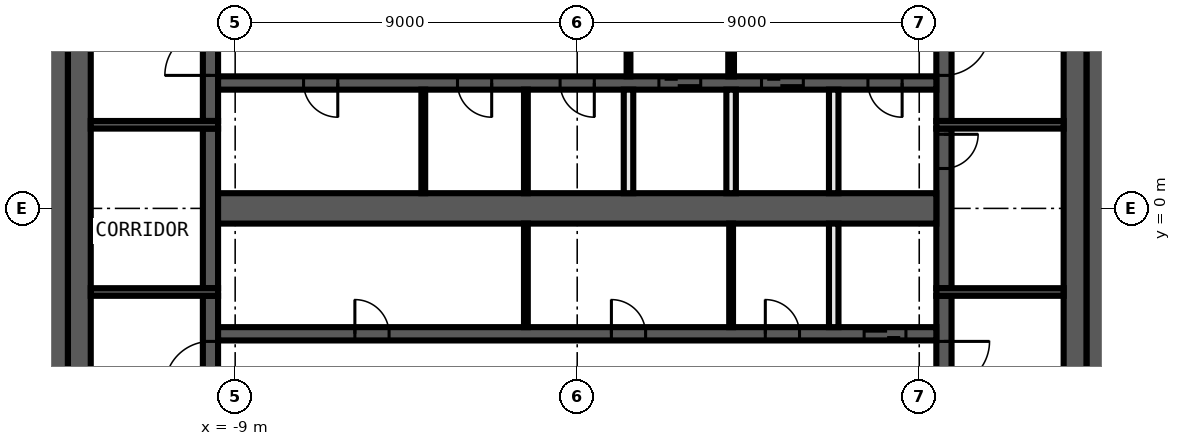
"""IFC4 building model, lengths in metres.
Left out: names, types, materials, properties, quantities, classifications, styles, units other than length and angle.
Written with IfcOpenShell. Run it as: python <this file> out.ifc"""

import sys

from ifc_helpers import new_model, si_unit, direction, frame, frame_2d, origin, place, context, subcontext, project, spatial, rectangle, extrude, element, fill, save


model = new_model("IFC4")
c1 = context("Model", 3, precision=1e-05, world=origin(), true_north=direction((0.0, 1.0)))
c2 = subcontext(c1, "Body", "Model", "MODEL_VIEW")
j1 = project(units=[si_unit("LENGTHUNIT", "METRE"), si_unit("PLANEANGLEUNIT", "RADIAN")], contexts=[c1])
p1 = place(None, origin())
s1 = spatial("IfcSite", under=j1, at=p1, CompositionType="ELEMENT")
p2 = place(p1, origin())
s2 = spatial("IfcBuilding", under=s1, at=p2, CompositionType="ELEMENT")
p3 = place(p2, frame((0.0, 0.0, 315.2)))
s3 = spatial("IfcBuildingStorey", under=s2, at=p3, CompositionType="ELEMENT", Elevation=315.2)
for number, where, z_axis, x_axis in (
    (1, (13.7, 10.4, 0.0), (0.0, 0.0, 1.0), (0.0, -1.0, 0.0)),
    (2, (-13.7, -10.4, 0.0), (0.0, 0.0, 1.0), (0.0, 1.0, 0.0)),
):
    element("IfcWall", number, at=place(p3, frame(where, z_axis=z_axis, x_axis=x_axis)), inside=s3, PredefinedType="SHEAR", context=c2, shape_type="SweptSolid", body=[
        extrude(rectangle(XDim=20.8, YDim=0.6, at=frame_2d((10.4, 0.0))), origin(), (0.0, 0.0, 1.0), 3.82),
    ])
for number, where, z_axis, x_axis in (
    (3, (13.1, 9.8, 0.0), (0.0, 0.0, 1.0), (0.0, -1.0, 0.0)),
    (4, (-13.1, -9.8, 0.0), (0.0, 0.0, 1.0), (0.0, 1.0, 0.0)),
):
    element("IfcWall", number, at=place(p3, frame(where, z_axis=z_axis, x_axis=x_axis)), inside=s3, PredefinedType="SHEAR", context=c2, shape_type="SweptSolid", body=[
        extrude(rectangle(XDim=19.6, YDim=0.6, at=frame_2d((9.8, 0.0))), origin(), (0.0, 0.0, 1.0), 3.82),
    ])
p4 = place(p3, frame((9.65, -2.3, 0.0), z_axis=(0.0, 0.0, 1.0), x_axis=(0.0, -1.0, 0.0)))
e5 = element("IfcWall", 5, at=p4, inside=s3, PredefinedType="SHEAR", context=c2, shape_type="SweptSolid", body=[
    extrude(rectangle(XDim=7.5, YDim=0.4, at=frame_2d((3.75, 0.0))), origin(), (0.0, 0.0, 1.0), 3.82),
])
p5 = place(p4, frame((1.2, 0.0, 0.0)))
e6 = element("IfcOpeningElement", 6, at=p5, cuts=e5, PredefinedType="OPENING", context=c2, shape_type="SweptSolid", body=[
    extrude(rectangle(XDim=1.2, YDim=2.1, at=frame_2d((0.6, 1.05))), frame((0.0, 0.21, 0.0), z_axis=(0.0, -1.0, 0.0), x_axis=(1.0, 0.0, 0.0)), (0.0, 0.0, 1.0), 0.42),
])
p6 = place(p3, frame((9.65, 2.1, 0.0), z_axis=(0.0, 0.0, 1.0), x_axis=(0.0, -1.0, 0.0)))
e7 = element("IfcWall", 7, at=p6, inside=s3, PredefinedType="SHEAR", context=c2, shape_type="SweptSolid", body=[
    extrude(rectangle(XDim=4.2, YDim=0.4, at=frame_2d((2.1, 0.0))), origin(), (0.0, 0.0, 1.0), 3.82),
])
p7 = place(p6, frame((0.15, 0.0, 0.0)))
e8 = element("IfcOpeningElement", 8, at=p7, cuts=e7, PredefinedType="OPENING", context=c2, shape_type="SweptSolid", body=[
    extrude(rectangle(XDim=0.9, YDim=2.1, at=frame_2d((0.45, 1.05))), frame((0.0, 0.21, 0.0), z_axis=(0.0, -1.0, 0.0), x_axis=(1.0, 0.0, 0.0)), (0.0, 0.0, 1.0), 0.42),
])
p8 = place(p3, frame((9.65, 9.8, 0.0), z_axis=(0.0, 0.0, 1.0), x_axis=(0.0, -1.0, 0.0)))
e9 = element("IfcWall", 9, at=p8, inside=s3, PredefinedType="SHEAR", context=c2, shape_type="SweptSolid", body=[
    extrude(rectangle(XDim=7.5, YDim=0.4, at=frame_2d((3.75, 0.0))), origin(), (0.0, 0.0, 1.0), 3.82),
])
p9 = place(p8, frame((5.1, 0.0, 0.0)))
e10 = element("IfcOpeningElement", 10, at=p9, cuts=e9, PredefinedType="OPENING", context=c2, shape_type="SweptSolid", body=[
    extrude(rectangle(XDim=1.2, YDim=2.1, at=frame_2d((0.6, 1.05))), frame((0.0, 0.21, 0.0), z_axis=(0.0, -1.0, 0.0), x_axis=(1.0, 0.0, 0.0)), (0.0, 0.0, 1.0), 0.42),
])
p10 = place(p3, frame((-9.65, -9.8, 0.0), z_axis=(0.0, 0.0, 1.0), x_axis=(0.0, 1.0, 0.0)))
e11 = element("IfcWall", 11, at=p10, inside=s3, PredefinedType="SHEAR", context=c2, shape_type="SweptSolid", body=[
    extrude(rectangle(XDim=7.5, YDim=0.4, at=frame_2d((3.75, 0.0))), origin(), (0.0, 0.0, 1.0), 3.82),
])
p11 = place(p10, frame((5.1, 0.0, 0.0)))
e12 = element("IfcOpeningElement", 12, at=p11, cuts=e11, PredefinedType="OPENING", context=c2, shape_type="SweptSolid", body=[
    extrude(rectangle(XDim=1.2, YDim=2.1, at=frame_2d((0.6, 1.05))), frame((0.0, 0.21, 0.0), z_axis=(0.0, -1.0, 0.0), x_axis=(1.0, 0.0, 0.0)), (0.0, 0.0, 1.0), 0.42),
])
p12 = place(p3, frame((-9.65, -2.1, 0.0), z_axis=(0.0, 0.0, 1.0), x_axis=(0.0, 1.0, 0.0)))
e13 = element("IfcWall", 13, at=p12, inside=s3, PredefinedType="SHEAR", context=c2, shape_type="SweptSolid", body=[
    extrude(rectangle(XDim=4.2, YDim=0.4, at=frame_2d((2.1, 0.0))), origin(), (0.0, 0.0, 1.0), 3.82),
])
p13 = place(p3, frame((-9.65, 2.3, 0.0), z_axis=(0.0, 0.0, 1.0), x_axis=(0.0, 1.0, 0.0)))
e14 = element("IfcWall", 14, at=p13, inside=s3, PredefinedType="SHEAR", context=c2, shape_type="SweptSolid", body=[
    extrude(rectangle(XDim=7.5, YDim=0.4, at=frame_2d((3.75, 0.0))), origin(), (0.0, 0.0, 1.0), 3.82),
])
p14 = place(p13, frame((1.2, 0.0, 0.0)))
e15 = element("IfcOpeningElement", 15, at=p14, cuts=e14, PredefinedType="OPENING", context=c2, shape_type="SweptSolid", body=[
    extrude(rectangle(XDim=1.2, YDim=2.1, at=frame_2d((0.6, 1.05))), frame((0.0, 0.21, 0.0), z_axis=(0.0, -1.0, 0.0), x_axis=(1.0, 0.0, 0.0)), (0.0, 0.0, 1.0), 0.42),
])
for number, where, z_axis, x_axis in (
    (16, (9.45, 2.2, 0.0), (0.0, 0.0, 1.0), (1.0, 0.0, 0.0)),
    (17, (-9.45, 2.2, 0.0), (0.0, 0.0, 1.0), (-1.0, 0.0, 0.0)),
    (18, (9.45, -2.2, 0.0), (0.0, 0.0, 1.0), (1.0, 0.0, 0.0)),
    (19, (-9.45, -2.2, 0.0), (0.0, 0.0, 1.0), (-1.0, 0.0, 0.0)),
):
    element("IfcWall", number, at=place(p3, frame(where, z_axis=z_axis, x_axis=x_axis)), inside=s3, PredefinedType="SHEAR", context=c2, shape_type="SweptSolid", body=[
        extrude(rectangle(XDim=3.35, YDim=0.2, at=frame_2d((1.675, 0.0))), origin(), (0.0, 0.0, 1.0), 3.82),
    ])
p15 = place(p3, frame((9.45, 3.3, 0.0), z_axis=(0.0, 0.0, 1.0), x_axis=(-1.0, 0.0, 0.0)))
e20 = element("IfcWall", 20, at=p15, inside=s3, PredefinedType="SHEAR", context=c2, shape_type="SweptSolid", body=[
    extrude(rectangle(XDim=18.9, YDim=0.35, at=frame_2d((9.45, 0.0))), origin(), (0.0, 0.0, 1.0), 3.82),
])
p16 = place(p15, frame((6.2, 0.0, 0.0)))
e21 = element("IfcOpeningElement", 21, at=p16, cuts=e20, PredefinedType="OPENING", context=c2, shape_type="SweptSolid", body=[
    extrude(rectangle(XDim=1.1, YDim=2.1, at=frame_2d((0.55, 1.05))), frame((0.0, 0.185, 0.0), z_axis=(0.0, -1.0, 0.0), x_axis=(1.0, 0.0, 0.0)), (0.0, 0.0, 1.0), 0.37),
])
p17 = place(p15, frame((3.5, 0.0, 0.0)))
e22 = element("IfcOpeningElement", 22, at=p17, cuts=e20, PredefinedType="OPENING", context=c2, shape_type="SweptSolid", body=[
    extrude(rectangle(XDim=1.1, YDim=2.1, at=frame_2d((0.55, 1.05))), frame((0.0, 0.185, 0.0), z_axis=(0.0, -1.0, 0.0), x_axis=(1.0, 0.0, 0.0)), (0.0, 0.0, 1.0), 0.37),
])
p18 = place(p15, frame((0.9, 0.0, 0.0)))
e23 = element("IfcOpeningElement", 23, at=p18, cuts=e20, PredefinedType="OPENING", context=c2, shape_type="SweptSolid", body=[
    extrude(rectangle(XDim=0.9, YDim=2.1, at=frame_2d((0.45, 1.05))), frame((0.0, 0.185, 0.0), z_axis=(0.0, -1.0, 0.0), x_axis=(1.0, 0.0, 0.0)), (0.0, 0.0, 1.0), 0.37),
])
p19 = place(p15, frame((15.75, 0.0, 0.0)))
e24 = element("IfcOpeningElement", 24, at=p19, cuts=e20, PredefinedType="OPENING", context=c2, shape_type="SweptSolid", body=[
    extrude(rectangle(XDim=0.9, YDim=2.1, at=frame_2d((0.45, 1.05))), frame((0.0, 0.185, 0.0), z_axis=(0.0, -1.0, 0.0), x_axis=(1.0, 0.0, 0.0)), (0.0, 0.0, 1.0), 0.37),
])
p20 = place(p15, frame((11.7, 0.0, 0.0)))
e25 = element("IfcOpeningElement", 25, at=p20, cuts=e20, PredefinedType="OPENING", context=c2, shape_type="SweptSolid", body=[
    extrude(rectangle(XDim=0.9, YDim=2.1, at=frame_2d((0.45, 1.05))), frame((0.0, 0.185, 0.0), z_axis=(0.0, -1.0, 0.0), x_axis=(1.0, 0.0, 0.0)), (0.0, 0.0, 1.0), 0.37),
])
p21 = place(p15, frame((9.0, 0.0, 0.0)))
e26 = element("IfcOpeningElement", 26, at=p21, cuts=e20, PredefinedType="OPENING", context=c2, shape_type="SweptSolid", body=[
    extrude(rectangle(XDim=0.9, YDim=2.1, at=frame_2d((0.45, 1.05))), frame((0.0, 0.185, 0.0), z_axis=(0.0, -1.0, 0.0), x_axis=(1.0, 0.0, 0.0)), (0.0, 0.0, 1.0), 0.37),
])
p22 = place(p3, frame((-9.45, -3.3, 0.0), z_axis=(0.0, 0.0, 1.0), x_axis=(1.0, 0.0, 0.0)))
e27 = element("IfcWall", 27, at=p22, inside=s3, PredefinedType="SHEAR", context=c2, shape_type="SweptSolid", body=[
    extrude(rectangle(XDim=18.9, YDim=0.35, at=frame_2d((9.45, 0.0))), origin(), (0.0, 0.0, 1.0), 3.82),
])
p23 = place(p22, frame((17.0, 0.0, 0.0)))
e28 = element("IfcOpeningElement", 28, at=p23, cuts=e27, PredefinedType="OPENING", context=c2, shape_type="SweptSolid", body=[
    extrude(rectangle(XDim=1.1, YDim=2.1, at=frame_2d((0.55, 1.05))), frame((0.0, 0.185, 0.0), z_axis=(0.0, -1.0, 0.0), x_axis=(1.0, 0.0, 0.0)), (0.0, 0.0, 1.0), 0.37),
])
p24 = place(p22, frame((3.6, 0.0, 0.0)))
e29 = element("IfcOpeningElement", 29, at=p24, cuts=e27, PredefinedType="OPENING", context=c2, shape_type="SweptSolid", body=[
    extrude(rectangle(XDim=0.9, YDim=2.1, at=frame_2d((0.45, 1.05))), frame((0.0, 0.185, 0.0), z_axis=(0.0, -1.0, 0.0), x_axis=(1.0, 0.0, 0.0)), (0.0, 0.0, 1.0), 0.37),
])
p25 = place(p22, frame((10.35, 0.0, 0.0)))
e30 = element("IfcOpeningElement", 30, at=p25, cuts=e27, PredefinedType="OPENING", context=c2, shape_type="SweptSolid", body=[
    extrude(rectangle(XDim=0.9, YDim=2.1, at=frame_2d((0.45, 1.05))), frame((0.0, 0.185, 0.0), z_axis=(0.0, -1.0, 0.0), x_axis=(1.0, 0.0, 0.0)), (0.0, 0.0, 1.0), 0.37),
])
p26 = place(p22, frame((14.4, 0.0, 0.0)))
e31 = element("IfcOpeningElement", 31, at=p26, cuts=e27, PredefinedType="OPENING", context=c2, shape_type="SweptSolid", body=[
    extrude(rectangle(XDim=0.9, YDim=2.1, at=frame_2d((0.45, 1.05))), frame((0.0, 0.185, 0.0), z_axis=(0.0, -1.0, 0.0), x_axis=(1.0, 0.0, 0.0)), (0.0, 0.0, 1.0), 0.37),
])
p27 = place(p3, frame((-9.45, 0.0, 0.0), z_axis=(0.0, 0.0, 1.0), x_axis=(1.0, 0.0, 0.0)))
e32 = element("IfcWall", 32, at=p27, inside=s3, PredefinedType="SHEAR", context=c2, shape_type="SweptSolid", body=[
    extrude(rectangle(XDim=18.9, YDim=0.8, at=frame_2d((9.45, 0.0))), origin(), (0.0, 0.0, 1.0), 3.82),
])
for number, where, z_axis, x_axis in (
    (33, (6.75, -3.125, 0.0), (0.0, 0.0, 1.0), (0.0, 1.0, 0.0)),
    (34, (6.75, 0.4, 0.0), (0.0, 0.0, 1.0), (0.0, 1.0, 0.0)),
):
    element("IfcWall", number, at=place(p3, frame(where, z_axis=z_axis, x_axis=x_axis)), inside=s3, PredefinedType="SOLIDWALL", context=c2, shape_type="SweptSolid", body=[
        extrude(rectangle(XDim=2.725, YDim=0.25, at=frame_2d((1.363, 0.0))), origin(), (0.0, 0.0, 1.0), 3.82),
    ])
p28 = place(p3, frame((4.05, 6.725, 0.0), z_axis=(0.0, 0.0, 1.0), x_axis=(0.0, -1.0, 0.0)))
e35 = element("IfcWall", 35, at=p28, inside=s3, PredefinedType="PARTITIONING", context=c2, shape_type="SweptSolid", body=[
    extrude(rectangle(XDim=3.25, YDim=0.15, at=frame_2d((1.625, 0.0))), origin(), (0.0, 0.0, 1.0), 3.82),
])
p29 = place(p28, frame((1.025, 0.0, 0.0)))
e36 = element("IfcOpeningElement", 36, at=p29, cuts=e35, PredefinedType="OPENING", context=c2, shape_type="SweptSolid", body=[
    extrude(rectangle(XDim=1.2, YDim=2.1, at=frame_2d((0.6, 1.05))), frame((0.0, 0.085, 0.0), z_axis=(0.0, -1.0, 0.0), x_axis=(1.0, 0.0, 0.0)), (0.0, 0.0, 1.0), 0.17),
])
p30 = place(p3, frame((4.05, -3.125, 0.0), z_axis=(0.0, 0.0, 1.0), x_axis=(0.0, 1.0, 0.0)))
e37 = element("IfcWall", 37, at=p30, inside=s3, PredefinedType="PARTITIONING", context=c2, shape_type="SweptSolid", body=[
    extrude(rectangle(XDim=2.725, YDim=0.1, at=frame_2d((1.363, 0.0))), origin(), (0.0, 0.0, 1.0), 3.82),
])
p31 = place(p3, frame((4.05, 0.4, 0.0), z_axis=(0.0, 0.0, 1.0), x_axis=(0.0, 1.0, 0.0)))
e38 = element("IfcWall", 38, at=p31, inside=s3, PredefinedType="SOLIDWALL", context=c2, shape_type="SweptSolid", body=[
    extrude(rectangle(XDim=2.725, YDim=0.25, at=frame_2d((1.363, 0.0))), origin(), (0.0, 0.0, 1.0), 3.82),
])
p32 = place(p3, frame((1.35, 6.725, 0.0), z_axis=(0.0, 0.0, 1.0), x_axis=(0.0, -1.0, 0.0)))
e39 = element("IfcWall", 39, at=p32, inside=s3, PredefinedType="PARTITIONING", context=c2, shape_type="SweptSolid", body=[
    extrude(rectangle(XDim=3.25, YDim=0.1, at=frame_2d((1.625, 0.0))), origin(), (0.0, 0.0, 1.0), 3.82),
])
p33 = place(p32, frame((1.025, 0.0, 0.0)))
e40 = element("IfcOpeningElement", 40, at=p33, cuts=e39, PredefinedType="OPENING", context=c2, shape_type="SweptSolid", body=[
    extrude(rectangle(XDim=1.2, YDim=2.1, at=frame_2d((0.6, 1.05))), frame((0.0, 0.06, 0.0), z_axis=(0.0, -1.0, 0.0), x_axis=(1.0, 0.0, 0.0)), (0.0, 0.0, 1.0), 0.12),
])
p34 = place(p3, frame((1.35, 0.4, 0.0), z_axis=(0.0, 0.0, 1.0), x_axis=(0.0, 1.0, 0.0)))
e41 = element("IfcWall", 41, at=p34, inside=s3, PredefinedType="SOLIDWALL", context=c2, shape_type="SweptSolid", body=[
    extrude(rectangle(XDim=2.725, YDim=0.25, at=frame_2d((1.363, 0.0))), origin(), (0.0, 0.0, 1.0), 3.82),
])
for number, where, z_axis, x_axis in (
    (42, (-1.35, -3.125, 0.0), (0.0, 0.0, 1.0), (0.0, 1.0, 0.0)),
    (43, (-1.35, 0.4, 0.0), (0.0, 0.0, 1.0), (0.0, 1.0, 0.0)),
    (44, (-4.05, 0.4, 0.0), (0.0, 0.0, 1.0), (0.0, 1.0, 0.0)),
):
    element("IfcWall", number, at=place(p3, frame(where, z_axis=z_axis, x_axis=x_axis)), inside=s3, PredefinedType="PARTITIONING", context=c2, shape_type="SweptSolid", body=[
        extrude(rectangle(XDim=2.725, YDim=0.1, at=frame_2d((1.363, 0.0))), origin(), (0.0, 0.0, 1.0), 3.82),
    ])
p35 = place(p7, origin())
e45 = element("IfcDoor", 45, at=p35, inside=s3, OperationType="SINGLE_SWING_RIGHT", PredefinedType="DOOR", context=c2, shape_type="SweptSolid", body=[
    extrude(rectangle(XDim=0.9, YDim=2.1, at=frame_2d((0.45, 1.05))), frame((0.0, 0.025, 0.0), z_axis=(0.0, -1.0, 0.0), x_axis=(1.0, 0.0, 0.0)), (0.0, 0.0, 1.0), 0.05),
])
fill(e8, e45)
p36 = place(p16, origin())
e46 = element("IfcDoor", 46, at=p36, inside=s3, OperationType="DOUBLE_DOOR_SLIDING", PredefinedType="DOOR", context=c2, shape_type="SweptSolid", body=[
    extrude(rectangle(XDim=1.1, YDim=2.1, at=frame_2d((0.55, 1.05))), frame((0.0, 0.025, 0.0), z_axis=(0.0, -1.0, 0.0), x_axis=(1.0, 0.0, 0.0)), (0.0, 0.0, 1.0), 0.05),
])
fill(e21, e46)
p37 = place(p17, origin())
e47 = element("IfcDoor", 47, at=p37, inside=s3, OperationType="DOUBLE_DOOR_SLIDING", PredefinedType="DOOR", context=c2, shape_type="SweptSolid", body=[
    extrude(rectangle(XDim=1.1, YDim=2.1, at=frame_2d((0.55, 1.05))), frame((0.0, 0.025, 0.0), z_axis=(0.0, -1.0, 0.0), x_axis=(1.0, 0.0, 0.0)), (0.0, 0.0, 1.0), 0.05),
])
fill(e22, e47)
p38 = place(p18, origin())
e48 = element("IfcDoor", 48, at=p38, inside=s3, OperationType="SINGLE_SWING_LEFT", PredefinedType="DOOR", context=c2, shape_type="SweptSolid", body=[
    extrude(rectangle(XDim=0.9, YDim=2.1, at=frame_2d((0.45, 1.05))), frame((0.0, 0.025, 0.0), z_axis=(0.0, -1.0, 0.0), x_axis=(1.0, 0.0, 0.0)), (0.0, 0.0, 1.0), 0.05),
])
fill(e23, e48)
p39 = place(p23, origin())
e49 = element("IfcDoor", 49, at=p39, inside=s3, OperationType="DOUBLE_DOOR_SLIDING", PredefinedType="DOOR", context=c2, shape_type="SweptSolid", body=[
    extrude(rectangle(XDim=1.1, YDim=2.1, at=frame_2d((0.55, 1.05))), frame((0.0, 0.025, 0.0), z_axis=(0.0, -1.0, 0.0), x_axis=(1.0, 0.0, 0.0)), (0.0, 0.0, 1.0), 0.05),
])
fill(e28, e49)
p40 = place(p19, origin())
e50 = element("IfcDoor", 50, at=p40, inside=s3, OperationType="SINGLE_SWING_LEFT", PredefinedType="DOOR", context=c2, shape_type="SweptSolid", body=[
    extrude(rectangle(XDim=0.9, YDim=2.1, at=frame_2d((0.45, 1.05))), frame((0.0, 0.025, 0.0), z_axis=(0.0, -1.0, 0.0), x_axis=(1.0, 0.0, 0.0)), (0.0, 0.0, 1.0), 0.05),
])
fill(e24, e50)
p41 = place(p20, origin())
e51 = element("IfcDoor", 51, at=p41, inside=s3, OperationType="SINGLE_SWING_RIGHT", PredefinedType="DOOR", context=c2, shape_type="SweptSolid", body=[
    extrude(rectangle(XDim=0.9, YDim=2.1, at=frame_2d((0.45, 1.05))), frame((0.0, 0.025, 0.0), z_axis=(0.0, -1.0, 0.0), x_axis=(1.0, 0.0, 0.0)), (0.0, 0.0, 1.0), 0.05),
])
fill(e25, e51)
p42 = place(p21, origin())
e52 = element("IfcDoor", 52, at=p42, inside=s3, OperationType="SINGLE_SWING_LEFT", PredefinedType="DOOR", context=c2, shape_type="SweptSolid", body=[
    extrude(rectangle(XDim=0.9, YDim=2.1, at=frame_2d((0.45, 1.05))), frame((0.0, 0.025, 0.0), z_axis=(0.0, -1.0, 0.0), x_axis=(1.0, 0.0, 0.0)), (0.0, 0.0, 1.0), 0.05),
])
fill(e26, e52)
p43 = place(p24, origin())
e53 = element("IfcDoor", 53, at=p43, inside=s3, OperationType="SINGLE_SWING_RIGHT", PredefinedType="DOOR", context=c2, shape_type="SweptSolid", body=[
    extrude(rectangle(XDim=0.9, YDim=2.1, at=frame_2d((0.45, 1.05))), frame((0.0, 0.025, 0.0), z_axis=(0.0, -1.0, 0.0), x_axis=(1.0, 0.0, 0.0)), (0.0, 0.0, 1.0), 0.05),
])
fill(e29, e53)
p44 = place(p25, origin())
e54 = element("IfcDoor", 54, at=p44, inside=s3, OperationType="SINGLE_SWING_LEFT", PredefinedType="DOOR", context=c2, shape_type="SweptSolid", body=[
    extrude(rectangle(XDim=0.9, YDim=2.1, at=frame_2d((0.45, 1.05))), frame((0.0, 0.025, 0.0), z_axis=(0.0, -1.0, 0.0), x_axis=(1.0, 0.0, 0.0)), (0.0, 0.0, 1.0), 0.05),
])
fill(e30, e54)
p45 = place(p26, origin())
e55 = element("IfcDoor", 55, at=p45, inside=s3, OperationType="SINGLE_SWING_RIGHT", PredefinedType="DOOR", context=c2, shape_type="SweptSolid", body=[
    extrude(rectangle(XDim=0.9, YDim=2.1, at=frame_2d((0.45, 1.05))), frame((0.0, 0.025, 0.0), z_axis=(0.0, -1.0, 0.0), x_axis=(1.0, 0.0, 0.0)), (0.0, 0.0, 1.0), 0.05),
])
fill(e31, e55)
p46 = place(p9, origin())
e56 = element("IfcDoor", 56, at=p46, inside=s3, OperationType="SINGLE_SWING_LEFT", PredefinedType="DOOR", context=c2, shape_type="SweptSolid", body=[
    extrude(rectangle(XDim=1.2, YDim=2.1, at=frame_2d((0.6, 1.05))), frame((0.0, 0.025, 0.0), z_axis=(0.0, -1.0, 0.0), x_axis=(1.0, 0.0, 0.0)), (0.0, 0.0, 1.0), 0.05),
])
fill(e10, e56)
p47 = place(p14, origin())
e57 = element("IfcDoor", 57, at=p47, inside=s3, OperationType="SINGLE_SWING_RIGHT", PredefinedType="DOOR", context=c2, shape_type="SweptSolid", body=[
    extrude(rectangle(XDim=1.2, YDim=2.1, at=frame_2d((0.6, 1.05))), frame((0.0, 0.025, 0.0), z_axis=(0.0, -1.0, 0.0), x_axis=(1.0, 0.0, 0.0)), (0.0, 0.0, 1.0), 0.05),
])
fill(e15, e57)
p48 = place(p5, origin())
e58 = element("IfcDoor", 58, at=p48, inside=s3, OperationType="SINGLE_SWING_RIGHT", PredefinedType="DOOR", context=c2, shape_type="SweptSolid", body=[
    extrude(rectangle(XDim=1.2, YDim=2.1, at=frame_2d((0.6, 1.05))), frame((0.0, 0.025, 0.0), z_axis=(0.0, -1.0, 0.0), x_axis=(1.0, 0.0, 0.0)), (0.0, 0.0, 1.0), 0.05),
])
fill(e6, e58)
p49 = place(p11, origin())
e59 = element("IfcDoor", 59, at=p49, inside=s3, OperationType="SINGLE_SWING_LEFT", PredefinedType="DOOR", context=c2, shape_type="SweptSolid", body=[
    extrude(rectangle(XDim=1.2, YDim=2.1, at=frame_2d((0.6, 1.05))), frame((0.0, 0.025, 0.0), z_axis=(0.0, -1.0, 0.0), x_axis=(1.0, 0.0, 0.0)), (0.0, 0.0, 1.0), 0.05),
])
fill(e12, e59)
save(model, sys.argv[1])
